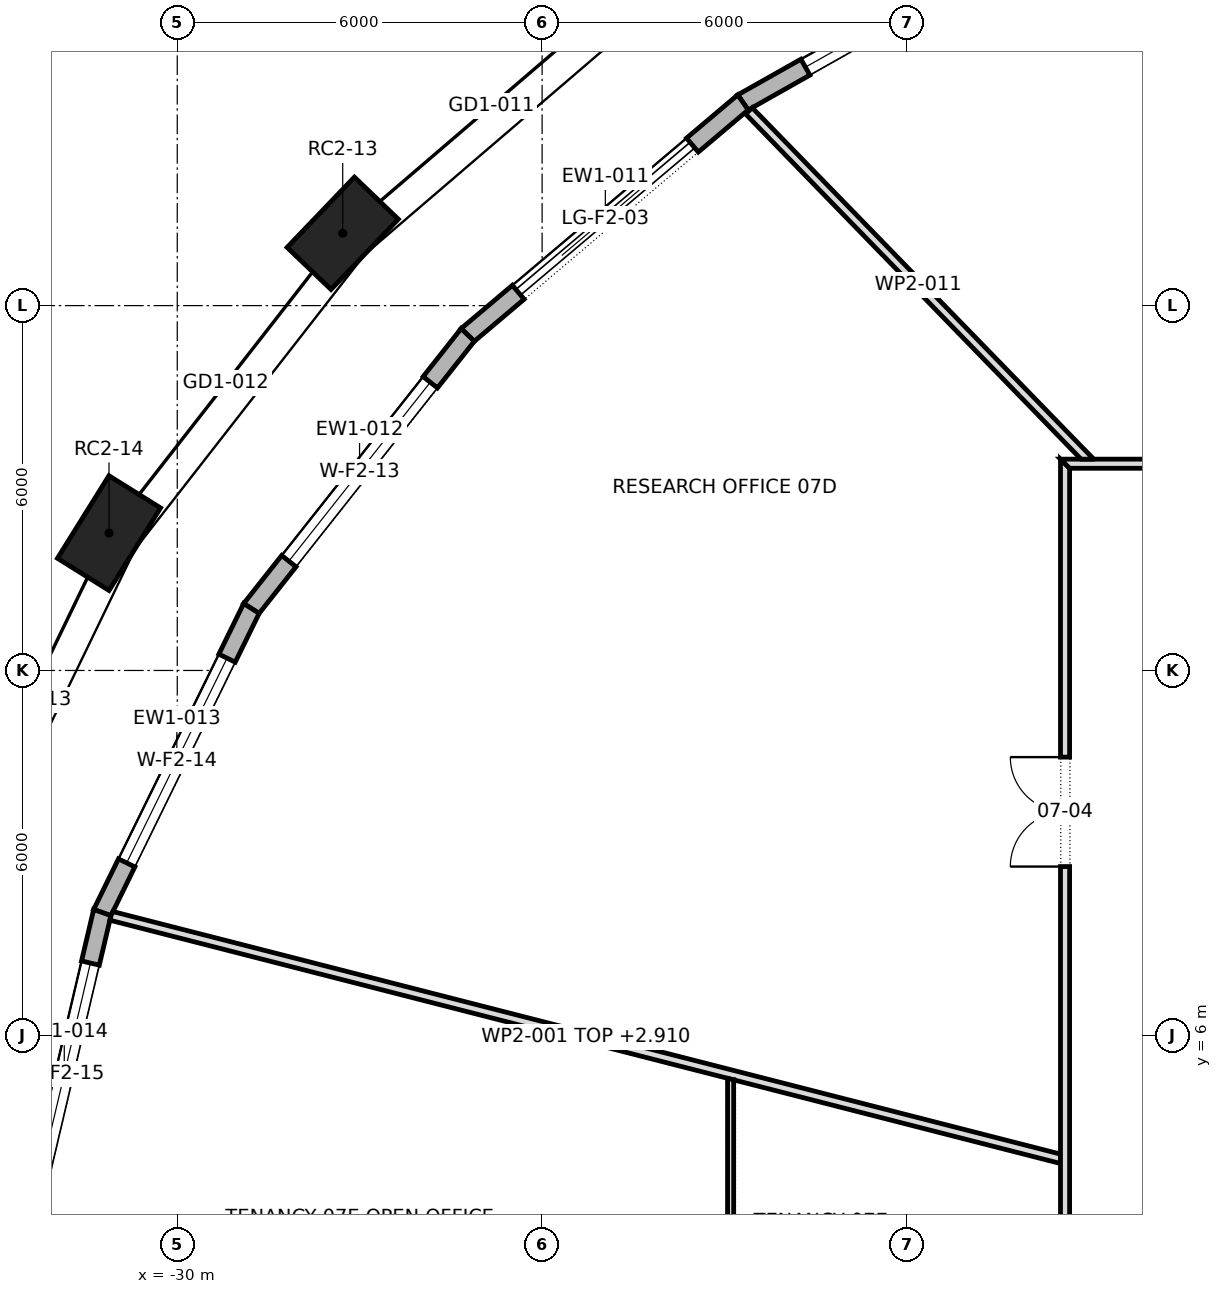
"""IFC4 building model, lengths in metres.
Left out: names, types, materials, properties, quantities, classifications, styles, units other than length and angle.
Written with IfcOpenShell. Run it as: python <this file> out.ifc"""

import sys

from ifc_helpers import new_model, si_unit, direction, frame, frame_2d, origin, origin_2d, place, context, subcontext, project, spatial, polyline, rectangle, outline, extrude, element, fill, save


model = new_model("IFC4")
c1 = context("Model", 3, precision=1e-05, world=origin(), true_north=direction((0.0, 1.0)))
c2 = subcontext(c1, "Body", "Model", "MODEL_VIEW")
j1 = project(units=[si_unit("LENGTHUNIT", "METRE"), si_unit("PLANEANGLEUNIT", "RADIAN")], contexts=[c1])
p1 = place(None, origin())
s1 = spatial("IfcSite", under=j1, at=p1, CompositionType="ELEMENT")
p2 = place(p1, origin())
s2 = spatial("IfcBuilding", under=s1, at=p2, CompositionType="ELEMENT")
p3 = place(p2, frame((0.0, 0.0, 104.5)))
s3 = spatial("IfcBuildingStorey", under=s2, at=p3, CompositionType="ELEMENT", Elevation=104.5)
for number, where, z_axis, x_axis in (
    (1, (-27.279, 19.189, 0.0), (0.0, 0.0, 1.0), (-0.692, -0.722, 0.0)),
    (2, (-31.123, 14.259, 0.0), (0.0, 0.0, 1.0), (-0.529, -0.849, 0.0)),
):
    element("IfcColumn", number, at=place(p3, frame(where, z_axis=z_axis, x_axis=x_axis)), inside=s3, PredefinedType="COLUMN", context=c2, shape_type="SweptSolid", body=[
        extrude(rectangle(XDim=1.6, YDim=1.0, at=origin_2d()), origin(), (0.0, 0.0, 1.0), 4.2),
    ])
p4 = place(p3, frame((-15.377, 24.344, 0.0), z_axis=(0.0, 0.0, 1.0), x_axis=(-0.870828448417, -0.491587035455, 0.0)))
e3 = element("IfcWall", 3, at=p4, inside=s3, PredefinedType="STANDARD", context=c2, shape_type="SweptSolid", body=[
    extrude(outline(polyline([(-0.013, -0.15), (6.123, -0.15), (6.094, 0.15), (0.013, 0.15), (-0.013, -0.15)])), origin(), (0.0, 0.0, 1.0), 3.9),
])
p5 = place(p4, frame((1.179, 0.0, 0.6)))
e4 = element("IfcOpeningElement", 4, at=p5, cuts=e3, PredefinedType="OPENING", context=c2, shape_type="SweptSolid", body=[
    extrude(rectangle(XDim=3.75, YDim=2.85, at=frame_2d((1.875, 1.425))), frame((0.0, 0.162, 0.0), z_axis=(0.0, -1.0, 0.0), x_axis=(1.0, 0.0, 0.0)), (0.0, 0.0, 1.0), 0.324),
])
p6 = place(p3, frame((-20.697, 21.341, 0.0), z_axis=(0.0, 0.0, 1.0), x_axis=(-0.763894031266, -0.645341699409, 0.0)))
e5 = element("IfcWall", 5, at=p6, inside=s3, PredefinedType="STANDARD", context=c2, shape_type="SweptSolid", body=[
    extrude(outline(polyline([(-0.014, -0.15), (5.94, -0.15), (5.91, 0.15), (0.014, 0.15), (-0.014, -0.15)])), origin(), (0.0, 0.0, 1.0), 3.9),
])
p7 = place(p6, frame((1.087, 0.0, 0.0)))
e6 = element("IfcOpeningElement", 6, at=p7, cuts=e5, PredefinedType="OPENING", context=c2, shape_type="SweptSolid", body=[
    extrude(rectangle(XDim=3.75, YDim=3.45, at=frame_2d((1.875, 1.725))), frame((0.0, 0.162, 0.0), z_axis=(0.0, -1.0, 0.0), x_axis=(1.0, 0.0, 0.0)), (0.0, 0.0, 1.0), 0.324),
])
p8 = place(p3, frame((-25.223, 17.518, 0.0), z_axis=(0.0, 0.0, 1.0), x_axis=(-0.620329992039, -0.784340934146, 0.0)))
e7 = element("IfcWall", 7, at=p8, inside=s3, PredefinedType="STANDARD", context=c2, shape_type="SweptSolid", body=[
    extrude(outline(polyline([(-0.015, -0.15), (5.751, -0.15), (5.719, 0.15), (0.015, 0.15), (-0.015, -0.15)])), origin(), (0.0, 0.0, 1.0), 3.9),
])
p9 = place(p8, frame((0.993, 0.0, 0.6)))
e8 = element("IfcOpeningElement", 8, at=p9, cuts=e7, PredefinedType="OPENING", context=c2, shape_type="SweptSolid", body=[
    extrude(rectangle(XDim=3.75, YDim=2.85, at=frame_2d((1.875, 1.425))), frame((0.0, 0.162, 0.0), z_axis=(0.0, -1.0, 0.0), x_axis=(1.0, 0.0, 0.0)), (0.0, 0.0, 1.0), 0.324),
])
p10 = place(p3, frame((-28.781, 13.019, 0.0), z_axis=(0.0, 0.0, 1.0), x_axis=(-0.440238988749, -0.897880633929, 0.0)))
e9 = element("IfcWall", 9, at=p10, inside=s3, PredefinedType="STANDARD", context=c2, shape_type="SweptSolid", body=[
    extrude(outline(polyline([(-0.016, -0.15), (5.586, -0.15), (5.553, 0.15), (0.016, 0.15), (-0.016, -0.15)])), origin(), (0.0, 0.0, 1.0), 3.9),
])
p11 = place(p10, frame((0.91, 0.0, 0.6)))
e10 = element("IfcOpeningElement", 10, at=p11, cuts=e9, PredefinedType="OPENING", context=c2, shape_type="SweptSolid", body=[
    extrude(rectangle(XDim=3.75, YDim=2.85, at=frame_2d((1.875, 1.425))), frame((0.0, 0.162, 0.0), z_axis=(0.0, -1.0, 0.0), x_axis=(1.0, 0.0, 0.0)), (0.0, 0.0, 1.0), 0.324),
])
p12 = place(p3, frame((-31.233, 8.019, 0.0), z_axis=(0.0, 0.0, 1.0), x_axis=(-0.229193964616, -0.973380771632, 0.0)))
e11 = element("IfcWall", 11, at=p12, inside=s3, PredefinedType="STANDARD", context=c2, shape_type="SweptSolid", body=[
    extrude(outline(polyline([(-0.017, -0.15), (5.473, -0.15), (5.439, 0.15), (0.017, 0.15), (-0.017, -0.15)])), origin(), (0.0, 0.0, 1.0), 3.9),
])
p13 = place(p12, frame((0.853, 0.0, 0.6)))
e12 = element("IfcOpeningElement", 12, at=p13, cuts=e11, PredefinedType="OPENING", context=c2, shape_type="SweptSolid", body=[
    extrude(rectangle(XDim=3.75, YDim=2.85, at=frame_2d((1.875, 1.425))), frame((0.0, 0.162, 0.0), z_axis=(0.0, -1.0, 0.0), x_axis=(1.0, 0.0, 0.0)), (0.0, 0.0, 1.0), 0.324),
])
p14 = place(p3, frame((-31.09, 7.966, 0.0), z_axis=(0.0, 0.0, 1.0), x_axis=(0.968771016809, -0.247957086995, 0.0)))
e13 = element("IfcWall", 13, at=p14, inside=s3, PredefinedType="PARTITIONING", context=c2, shape_type="SweptSolid", body=[
    extrude(outline(polyline([(16.137, -0.075), (16.137, -0.073), (16.099, 0.075), (14.312, 0.075), (12.524, 0.075), (10.737, 0.075), (8.95, 0.075), (7.163, 0.075), (5.375, 0.075), (3.588, 0.075), (1.801, 0.075), (0.014, 0.075), (0.0, 0.008), (0.0, -0.067), (0.0, -0.075), (1.793, -0.075), (3.586, -0.075), (5.379, -0.075), (7.172, -0.075), (8.965, -0.075), (10.758, -0.075), (12.551, -0.075), (14.344, -0.075), (16.137, -0.075)])), origin(), (0.0, 0.0, 1.0), 2.91),
])
p15 = place(p3, frame((-20.9, -14.434, 0.0), z_axis=(0.0, 0.0, 1.0), x_axis=(0.0, 1.0, 0.0)))
e14 = element("IfcWall", 14, at=p15, inside=s3, PredefinedType="PARTITIONING", context=c2, shape_type="SweptSolid", body=[
    extrude(outline(polyline([(0.069, -0.05), (1.772, -0.05), (3.475, -0.05), (5.178, -0.05), (6.881, -0.05), (8.583, -0.05), (8.583, -0.05), (8.684, -0.05), (8.684, -0.05), (10.321, -0.05), (11.958, -0.05), (13.596, -0.05), (15.234, -0.05), (15.234, -0.05), (15.333, -0.05), (15.333, -0.05), (16.789, -0.05), (18.245, -0.05), (19.701, -0.05), (19.727, 0.05), (19.727, 0.05), (17.942, 0.05), (16.156, 0.05), (14.372, 0.05), (12.587, 0.05), (10.802, 0.05), (9.017, 0.05), (9.01, 0.048), (9.009, 0.05), (7.208, 0.05), (5.406, 0.05), (3.604, 0.05), (1.802, 0.05), (0.0, 0.05), (0.069, -0.05)])), origin(), (0.0, 0.0, 1.0), 3.9),
])
p16 = place(p15, frame((13.539, 0.0, 0.0)))
e15 = element("IfcOpeningElement", 15, at=p16, cuts=e14, PredefinedType="OPENING", context=c2, shape_type="SweptSolid", body=[
    extrude(rectangle(XDim=0.9, YDim=2.1, at=frame_2d((0.45, 1.05))), frame((0.0, 0.062, 0.0), z_axis=(0.0, -1.0, 0.0), x_axis=(1.0, 0.0, 0.0)), (0.0, 0.0, 1.0), 0.124),
])
p17 = place(p3, frame((-15.4, -15.475, 0.0), z_axis=(0.0, 0.0, 1.0), x_axis=(0.0, 1.0, 0.0)))
e16 = element("IfcWall", 16, at=p17, inside=s3, PredefinedType="PARTITIONING", context=c2, shape_type="SweptSolid", body=[
    extrude(outline(polyline([(0.15, -0.075), (2.066, -0.075), (3.981, -0.075), (5.897, -0.075), (7.812, -0.075), (9.728, -0.075), (11.644, -0.075), (13.56, -0.075), (15.475, -0.075), (17.391, -0.075), (19.306, -0.075), (21.222, -0.075), (23.138, -0.075), (25.053, -0.075), (26.969, -0.075), (28.885, -0.075), (30.8, -0.075), (30.95, 0.075), (29.016, 0.075), (27.081, 0.075), (25.147, 0.075), (23.212, 0.075), (21.278, 0.075), (19.344, 0.075), (17.409, 0.075), (15.475, 0.075), (13.541, 0.075), (11.606, 0.075), (9.672, 0.075), (7.738, 0.075), (5.803, 0.075), (3.869, 0.075), (1.935, 0.075), (0.0, 0.075), (0.15, -0.075)])), origin(), (0.0, 0.0, 1.0), 3.9),
])
p18 = place(p17, frame((24.25, 0.0, 0.0)))
e17 = element("IfcOpeningElement", 17, at=p18, cuts=e16, PredefinedType="OPENING", context=c2, shape_type="SweptSolid", body=[
    extrude(rectangle(XDim=1.8, YDim=2.1, at=frame_2d((0.9, 1.05))), frame((0.0, 0.087, 0.0), z_axis=(0.0, -1.0, 0.0), x_axis=(1.0, 0.0, 0.0)), (0.0, 0.0, 1.0), 0.174),
])
p19 = place(p17, frame((6.735, 0.0, 0.0)))
e18 = element("IfcOpeningElement", 18, at=p19, cuts=e16, PredefinedType="OPENING", context=c2, shape_type="SweptSolid", body=[
    extrude(rectangle(XDim=1.0, YDim=2.1, at=frame_2d((0.5, 1.05))), frame((0.0, 0.087, 0.0), z_axis=(0.0, -1.0, 0.0), x_axis=(1.0, 0.0, 0.0)), (0.0, 0.0, 1.0), 0.174),
])
p20 = place(p17, frame((12.5, 0.0, 0.0)))
e19 = element("IfcOpeningElement", 19, at=p20, cuts=e16, PredefinedType="OPENING", context=c2, shape_type="SweptSolid", body=[
    extrude(rectangle(XDim=1.0, YDim=2.1, at=frame_2d((0.5, 1.05))), frame((0.0, 0.087, 0.0), z_axis=(0.0, -1.0, 0.0), x_axis=(1.0, 0.0, 0.0)), (0.0, 0.0, 1.0), 0.174),
])
p21 = place(p17, frame((17.375, 0.0, 0.0)))
e20 = element("IfcOpeningElement", 20, at=p21, cuts=e16, PredefinedType="OPENING", context=c2, shape_type="SweptSolid", body=[
    extrude(rectangle(XDim=1.0, YDim=2.1, at=frame_2d((0.5, 1.05))), frame((0.0, 0.087, 0.0), z_axis=(0.0, -1.0, 0.0), x_axis=(1.0, 0.0, 0.0)), (0.0, 0.0, 1.0), 0.174),
])
p22 = place(p3, frame((-15.475, 15.4, 0.0), z_axis=(0.0, 0.0, 1.0), x_axis=(1.0, 0.0, 0.0)))
e21 = element("IfcWall", 21, at=p22, inside=s3, PredefinedType="PARTITIONING", context=c2, shape_type="SweptSolid", body=[
    extrude(outline(polyline([(0.15, -0.075), (2.066, -0.075), (3.981, -0.075), (5.897, -0.075), (7.812, -0.075), (9.728, -0.075), (11.644, -0.075), (13.56, -0.075), (15.475, -0.075), (17.391, -0.075), (19.306, -0.075), (21.222, -0.075), (23.138, -0.075), (25.053, -0.075), (26.969, -0.075), (28.885, -0.075), (30.8, -0.075), (30.95, 0.075), (29.016, 0.075), (27.081, 0.075), (25.147, 0.075), (23.212, 0.075), (21.278, 0.075), (19.344, 0.075), (17.409, 0.075), (15.475, 0.075), (13.541, 0.075), (11.606, 0.075), (9.672, 0.075), (7.738, 0.075), (5.803, 0.075), (3.869, 0.075), (1.935, 0.075), (0.0, 0.075), (0.15, -0.075)])), origin(), (0.0, 0.0, 1.0), 3.9),
])
p23 = place(p22, frame((27.545, 0.0, 0.0)))
e22 = element("IfcOpeningElement", 22, at=p23, cuts=e21, PredefinedType="OPENING", context=c2, shape_type="SweptSolid", body=[
    extrude(rectangle(XDim=1.0, YDim=2.1, at=frame_2d((0.5, 1.05))), frame((0.0, 0.087, 0.0), z_axis=(0.0, -1.0, 0.0), x_axis=(1.0, 0.0, 0.0)), (0.0, 0.0, 1.0), 0.174),
])
p24 = place(p22, frame((18.545, 0.0, 0.0)))
e23 = element("IfcOpeningElement", 23, at=p24, cuts=e21, PredefinedType="OPENING", context=c2, shape_type="SweptSolid", body=[
    extrude(rectangle(XDim=1.8, YDim=2.1, at=frame_2d((0.9, 1.05))), frame((0.0, 0.087, 0.0), z_axis=(0.0, -1.0, 0.0), x_axis=(1.0, 0.0, 0.0)), (0.0, 0.0, 1.0), 0.174),
])
p25 = place(p22, frame((6.195, 0.0, 0.0)))
e24 = element("IfcOpeningElement", 24, at=p25, cuts=e21, PredefinedType="OPENING", context=c2, shape_type="SweptSolid", body=[
    extrude(rectangle(XDim=1.8, YDim=2.1, at=frame_2d((0.9, 1.05))), frame((0.0, 0.087, 0.0), z_axis=(0.0, -1.0, 0.0), x_axis=(1.0, 0.0, 0.0)), (0.0, 0.0, 1.0), 0.174),
])
p26 = place(p3, frame((-14.982, 15.423, 0.0), z_axis=(0.0, 0.0, 1.0), x_axis=(-0.696915710248, 0.717153046992, 0.0)))
e25 = element("IfcWall", 25, at=p26, inside=s3, PredefinedType="PARTITIONING", context=c2, shape_type="SweptSolid", body=[
    extrude(outline(polyline([(8.059, 0.075), (6.08, 0.075), (4.102, 0.075), (2.124, 0.075), (0.146, 0.075), (0.0, -0.075), (0.0, -0.075), (1.612, -0.075), (3.223, -0.075), (4.835, -0.075), (6.447, -0.075), (8.059, -0.075), (8.059, 0.075)])), origin(), (0.0, 0.0, 1.0), 3.9),
])
p27 = place(p5, origin())
e26 = element("IfcWindow", 26, at=p27, inside=s3, PartitioningType="TRIPLE_PANEL_VERTICAL", PredefinedType="WINDOW", context=c2, shape_type="SweptSolid", body=[
    extrude(rectangle(XDim=3.75, YDim=2.85, at=frame_2d((1.875, 1.425))), frame((0.0, 0.03, 0.0), z_axis=(0.0, -1.0, 0.0), x_axis=(1.0, 0.0, 0.0)), (0.0, 0.0, 1.0), 0.06),
])
fill(e4, e26)
p28 = place(p7, origin())
e27 = element("IfcDoor", 27, at=p28, inside=s3, OperationType="DOUBLE_DOOR_SLIDING", PredefinedType="DOOR", context=c2, shape_type="SweptSolid", body=[
    extrude(rectangle(XDim=3.75, YDim=3.45, at=frame_2d((1.875, 1.725))), frame((0.0, 0.025, 0.0), z_axis=(0.0, -1.0, 0.0), x_axis=(1.0, 0.0, 0.0)), (0.0, 0.0, 1.0), 0.05),
])
fill(e6, e27)
p29 = place(p9, origin())
e28 = element("IfcWindow", 28, at=p29, inside=s3, PartitioningType="TRIPLE_PANEL_VERTICAL", PredefinedType="WINDOW", context=c2, shape_type="SweptSolid", body=[
    extrude(rectangle(XDim=3.75, YDim=2.85, at=frame_2d((1.875, 1.425))), frame((0.0, 0.03, 0.0), z_axis=(0.0, -1.0, 0.0), x_axis=(1.0, 0.0, 0.0)), (0.0, 0.0, 1.0), 0.06),
])
fill(e8, e28)
p30 = place(p11, origin())
e29 = element("IfcWindow", 29, at=p30, inside=s3, PartitioningType="TRIPLE_PANEL_VERTICAL", PredefinedType="WINDOW", context=c2, shape_type="SweptSolid", body=[
    extrude(rectangle(XDim=3.75, YDim=2.85, at=frame_2d((1.875, 1.425))), frame((0.0, 0.03, 0.0), z_axis=(0.0, -1.0, 0.0), x_axis=(1.0, 0.0, 0.0)), (0.0, 0.0, 1.0), 0.06),
])
fill(e10, e29)
p31 = place(p13, origin())
e30 = element("IfcWindow", 30, at=p31, inside=s3, PartitioningType="TRIPLE_PANEL_VERTICAL", PredefinedType="WINDOW", context=c2, shape_type="SweptSolid", body=[
    extrude(rectangle(XDim=3.75, YDim=2.85, at=frame_2d((1.875, 1.425))), frame((0.0, 0.03, 0.0), z_axis=(0.0, -1.0, 0.0), x_axis=(1.0, 0.0, 0.0)), (0.0, 0.0, 1.0), 0.06),
])
fill(e12, e30)
p32 = place(p18, origin())
e31 = element("IfcDoor", 31, at=p32, inside=s3, OperationType="DOUBLE_DOOR_SINGLE_SWING", PredefinedType="DOOR", context=c2, shape_type="SweptSolid", body=[
    extrude(rectangle(XDim=1.8, YDim=2.1, at=frame_2d((0.9, 1.05))), frame((0.0, 0.025, 0.0), z_axis=(0.0, -1.0, 0.0), x_axis=(1.0, 0.0, 0.0)), (0.0, 0.0, 1.0), 0.05),
])
fill(e17, e31)
save(model, sys.argv[1])
